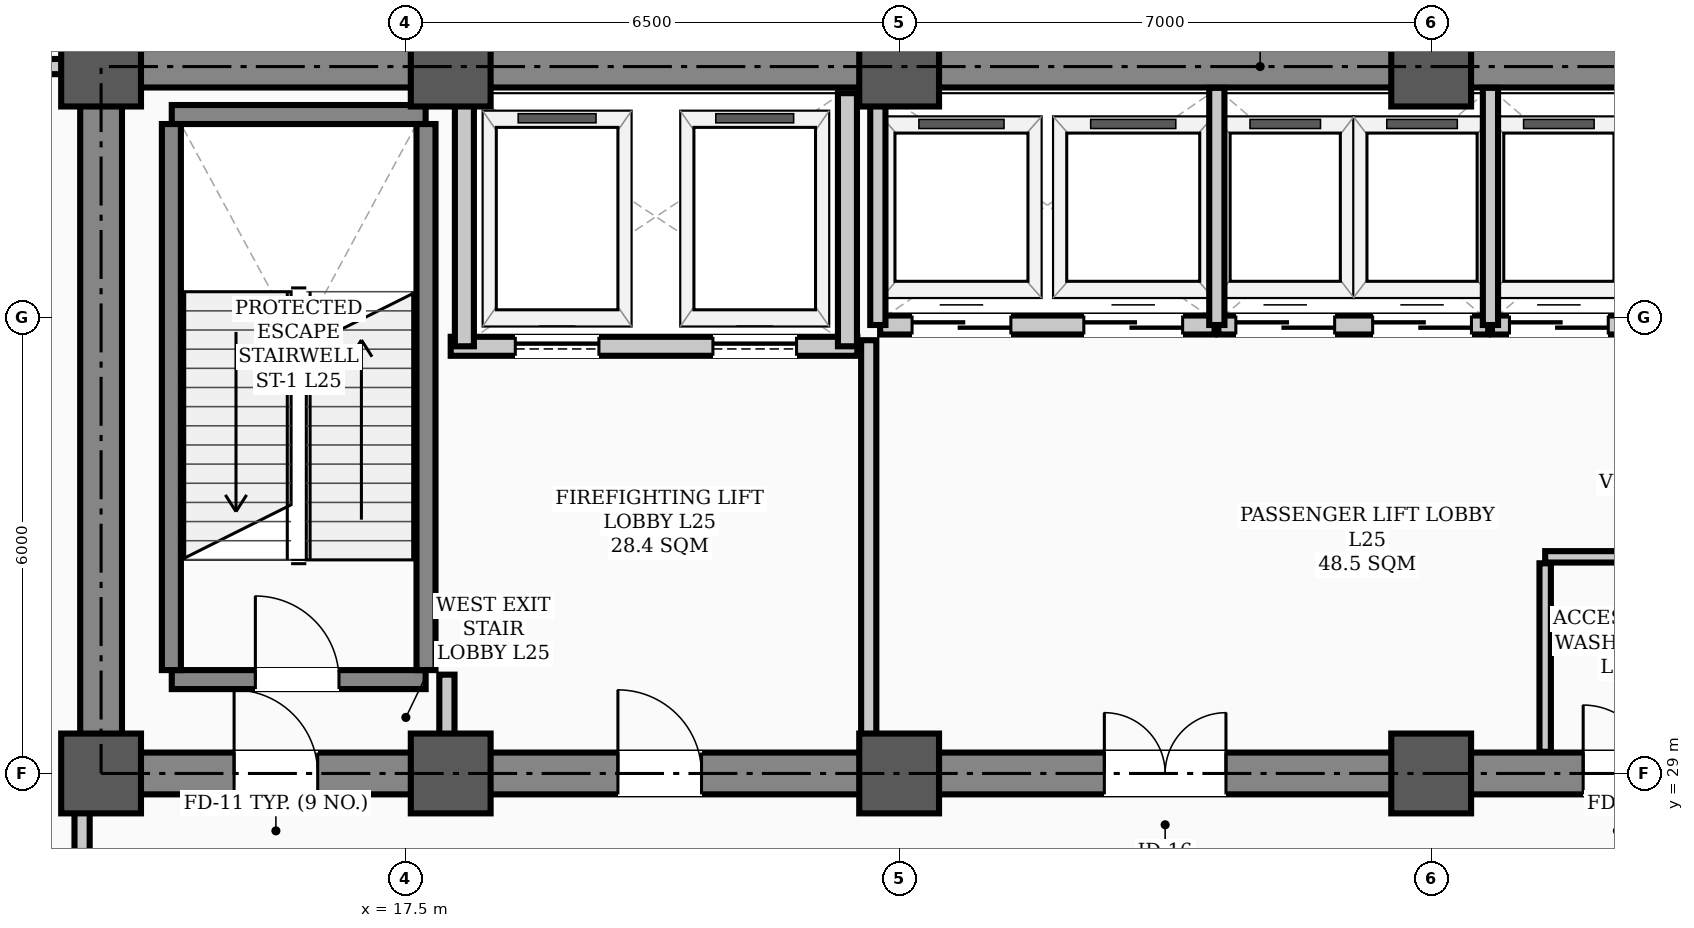
"""IFC4 building model, lengths in metres.
Left out: names, types, materials, properties, quantities, classifications, styles, units other than length and angle.
Written with IfcOpenShell. Run it as: python <this file> out.ifc"""

import sys

from ifc_helpers import new_model, si_unit, direction, frame, frame_2d, origin, origin_2d, place, context, subcontext, project, spatial, rectangle, hollow_rectangle, extrude, element, fill, save


model = new_model("IFC4")
c1 = context("Model", 3, precision=1e-05, world=origin(), true_north=direction((0.0, 1.0)))
c2 = subcontext(c1, "Body", "Model", "MODEL_VIEW")
j1 = project(units=[si_unit("LENGTHUNIT", "METRE"), si_unit("PLANEANGLEUNIT", "RADIAN")], contexts=[c1])
p1 = place(None, origin())
s1 = spatial("IfcSite", under=j1, at=p1, CompositionType="ELEMENT")
p2 = place(p1, origin())
s2 = spatial("IfcBuilding", under=s1, at=p2, CompositionType="ELEMENT")
p3 = place(p2, frame((0.0, 0.0, 100.6)))
s3 = spatial("IfcBuildingStorey", under=s2, at=p3, CompositionType="ELEMENT", Elevation=100.6)
for number, where, z_axis, x_axis in (
    (1, (13.5, 29.0, 0.0), (0.0, 0.0, 1.0), (1.0, 0.0, 0.0)),
    (2, (13.5, 38.3, 0.0), (0.0, 0.0, 1.0), (1.0, 0.0, 0.0)),
    (3, (18.1, 29.0, 0.0), (0.0, 0.0, 1.0), (1.0, 0.0, 0.0)),
    (4, (18.1, 38.3, 0.0), (0.0, 0.0, 1.0), (1.0, 0.0, 0.0)),
    (5, (24.0, 29.0, 0.0), (0.0, 0.0, 1.0), (1.0, 0.0, 0.0)),
    (6, (24.0, 38.3, 0.0), (0.0, 0.0, 1.0), (1.0, 0.0, 0.0)),
    (7, (31.0, 29.0, 0.0), (0.0, 0.0, 1.0), (1.0, 0.0, 0.0)),
    (8, (31.0, 38.3, 0.0), (0.0, 0.0, 1.0), (1.0, 0.0, 0.0)),
):
    element("IfcColumn", number, at=place(p3, frame(where, z_axis=z_axis, x_axis=x_axis)), inside=s3, PredefinedType="COLUMN", context=c2, shape_type="SweptSolid", body=[
        extrude(hollow_rectangle(XDim=1.05, YDim=1.05, WallThickness=0.038, InnerFilletRadius=0.019, OuterFilletRadius=0.057, at=origin_2d()), origin(), (0.0, 0.0, 1.0), 5.4),
    ])
p4 = place(p3, frame((13.5, 29.0, 0.0), z_axis=(0.0, 0.0, 1.0), x_axis=(1.0, 0.0, 0.0)))
e9 = element("IfcWall", 9, at=p4, inside=s3, PredefinedType="SHEAR", context=c2, shape_type="SweptSolid", body=[
    extrude(rectangle(XDim=30.5, YDim=0.55, at=frame_2d((15.25, 0.0))), origin(), (0.0, 0.0, 1.0), 5.22),
])
p5 = place(p4, frame((1.75, 0.0, 0.0)))
e10 = element("IfcOpeningElement", 10, at=p5, cuts=e9, PredefinedType="OPENING", context=c2, shape_type="SweptSolid", body=[
    extrude(rectangle(XDim=1.1, YDim=2.08, at=frame_2d((0.55, 1.04))), frame((0.0, 0.285, 0.0), z_axis=(0.0, -1.0, 0.0), x_axis=(1.0, 0.0, 0.0)), (0.0, 0.0, 1.0), 0.57),
])
p6 = place(p4, frame((26.7, 0.0, 0.0)))
e11 = element("IfcOpeningElement", 11, at=p6, cuts=e9, PredefinedType="OPENING", context=c2, shape_type="SweptSolid", body=[
    extrude(rectangle(XDim=1.1, YDim=2.08, at=frame_2d((0.55, 1.04))), frame((0.0, 0.285, 0.0), z_axis=(0.0, -1.0, 0.0), x_axis=(1.0, 0.0, 0.0)), (0.0, 0.0, 1.0), 0.57),
])
p7 = place(p4, frame((6.8, 0.0, 0.0)))
e12 = element("IfcOpeningElement", 12, at=p7, cuts=e9, PredefinedType="OPENING", context=c2, shape_type="SweptSolid", body=[
    extrude(rectangle(XDim=1.1, YDim=2.08, at=frame_2d((0.55, 1.04))), frame((0.0, 0.285, 0.0), z_axis=(0.0, -1.0, 0.0), x_axis=(1.0, 0.0, 0.0)), (0.0, 0.0, 1.0), 0.57),
])
p8 = place(p4, frame((13.2, 0.0, 0.0)))
e13 = element("IfcOpeningElement", 13, at=p8, cuts=e9, PredefinedType="OPENING", context=c2, shape_type="SweptSolid", body=[
    extrude(rectangle(XDim=1.6, YDim=2.08, at=frame_2d((0.8, 1.04))), frame((0.0, 0.285, 0.0), z_axis=(0.0, -1.0, 0.0), x_axis=(1.0, 0.0, 0.0)), (0.0, 0.0, 1.0), 0.57),
])
p9 = place(p4, frame((19.5, 0.0, 0.0)))
e14 = element("IfcOpeningElement", 14, at=p9, cuts=e9, PredefinedType="OPENING", context=c2, shape_type="SweptSolid", body=[
    extrude(rectangle(XDim=0.9, YDim=2.08, at=frame_2d((0.45, 1.04))), frame((0.0, 0.285, 0.0), z_axis=(0.0, -1.0, 0.0), x_axis=(1.0, 0.0, 0.0)), (0.0, 0.0, 1.0), 0.57),
])
p10 = place(p4, frame((21.55, 0.0, 0.0)))
e15 = element("IfcOpeningElement", 15, at=p10, cuts=e9, PredefinedType="OPENING", context=c2, shape_type="SweptSolid", body=[
    extrude(rectangle(XDim=0.9, YDim=2.08, at=frame_2d((0.45, 1.04))), frame((0.0, 0.285, 0.0), z_axis=(0.0, -1.0, 0.0), x_axis=(1.0, 0.0, 0.0)), (0.0, 0.0, 1.0), 0.57),
])
p11 = place(p3, frame((13.5, 38.3, 0.0), z_axis=(0.0, 0.0, 1.0), x_axis=(1.0, 0.0, 0.0)))
e16 = element("IfcWall", 16, at=p11, inside=s3, PredefinedType="SHEAR", context=c2, shape_type="SweptSolid", body=[
    extrude(rectangle(XDim=30.5, YDim=0.55, at=frame_2d((15.25, 0.0))), origin(), (0.0, 0.0, 1.0), 5.22),
])
p12 = place(p3, frame((13.5, 29.35, 0.0), z_axis=(0.0, 0.0, 1.0), x_axis=(0.0, 1.0, 0.0)))
e17 = element("IfcWall", 17, at=p12, inside=s3, PredefinedType="SHEAR", context=c2, shape_type="SweptSolid", body=[
    extrude(rectangle(XDim=8.6, YDim=0.55, at=frame_2d((4.3, 0.0))), origin(), (0.0, 0.0, 1.0), 5.22),
])
p13 = place(p3, frame((14.43, 30.235, 0.0), z_axis=(0.0, 0.0, 1.0), x_axis=(1.0, 0.0, 0.0)))
e18 = element("IfcWall", 18, at=p13, inside=s3, PredefinedType="STANDARD", context=c2, shape_type="SweptSolid", body=[
    extrude(rectangle(XDim=3.34, YDim=0.25, at=frame_2d((1.67, 0.0))), origin(), (0.0, 0.0, 1.0), 5.22),
])
p14 = place(p13, frame((1.1, 0.0, 0.0)))
e19 = element("IfcOpeningElement", 19, at=p14, cuts=e18, PredefinedType="OPENING", context=c2, shape_type="SweptSolid", body=[
    extrude(rectangle(XDim=1.1, YDim=2.08, at=frame_2d((0.55, 1.04))), frame((0.0, 0.135, 0.0), z_axis=(0.0, -1.0, 0.0), x_axis=(1.0, 0.0, 0.0)), (0.0, 0.0, 1.0), 0.27),
])
p15 = place(p3, frame((14.43, 37.669, 0.0), z_axis=(0.0, 0.0, 1.0), x_axis=(1.0, 0.0, 0.0)))
e20 = element("IfcWall", 20, at=p15, inside=s3, PredefinedType="STANDARD", context=c2, shape_type="SweptSolid", body=[
    extrude(rectangle(XDim=3.34, YDim=0.25, at=frame_2d((1.67, 0.0))), origin(), (0.0, 0.0, 1.0), 5.22),
])
for number, where, z_axis, x_axis in (
    (21, (14.425, 30.36, 0.0), (0.0, 0.0, 1.0), (0.0, 1.0, 0.0)),
    (22, (17.775, 30.36, 0.0), (0.0, 0.0, 1.0), (0.0, 1.0, 0.0)),
):
    element("IfcWall", number, at=place(p3, frame(where, z_axis=z_axis, x_axis=x_axis)), inside=s3, PredefinedType="STANDARD", context=c2, shape_type="SweptSolid", body=[
        extrude(rectangle(XDim=7.184, YDim=0.25, at=frame_2d((3.592, 0.0))), origin(), (0.0, 0.0, 1.0), 5.22),
    ])
p16 = place(p3, frame((18.1, 34.62, 0.0), z_axis=(0.0, 0.0, 1.0), x_axis=(1.0, 0.0, 0.0)))
e23 = element("IfcWall", 23, at=p16, inside=s3, PredefinedType="STANDARD", context=c2, shape_type="SweptSolid", body=[
    extrude(rectangle(XDim=5.35, YDim=0.25, at=frame_2d((2.675, 0.0))), origin(), (0.0, 0.0, 1.0), 5.22),
])
p17 = place(p16, frame((0.85, 0.0, 0.0)))
e24 = element("IfcOpeningElement", 24, at=p17, cuts=e23, PredefinedType="OPENING", context=c2, shape_type="SweptSolid", body=[
    extrude(rectangle(XDim=1.1, YDim=2.08, at=frame_2d((0.55, 1.04))), frame((0.0, 0.135, 0.0), z_axis=(0.0, -1.0, 0.0), x_axis=(1.0, 0.0, 0.0)), (0.0, 0.0, 1.0), 0.27),
])
p18 = place(p16, frame((3.45, 0.0, 0.0)))
e25 = element("IfcOpeningElement", 25, at=p18, cuts=e23, PredefinedType="OPENING", context=c2, shape_type="SweptSolid", body=[
    extrude(rectangle(XDim=1.1, YDim=2.08, at=frame_2d((0.55, 1.04))), frame((0.0, 0.135, 0.0), z_axis=(0.0, -1.0, 0.0), x_axis=(1.0, 0.0, 0.0)), (0.0, 0.0, 1.0), 0.27),
])
for number, where, z_axis, x_axis in (
    (26, (18.28, 34.62, 0.0), (0.0, 0.0, 1.0), (0.0, 1.0, 0.0)),
    (27, (23.32, 34.62, 0.0), (0.0, 0.0, 1.0), (0.0, 1.0, 0.0)),
):
    element("IfcWall", number, at=place(p3, frame(where, z_axis=z_axis, x_axis=x_axis)), inside=s3, PredefinedType="STANDARD", context=c2, shape_type="SweptSolid", body=[
        extrude(rectangle(XDim=3.33, YDim=0.25, at=frame_2d((1.665, 0.0))), origin(), (0.0, 0.0, 1.0), 4.8),
    ])
p19 = place(p3, frame((23.75, 34.9, 0.0), z_axis=(0.0, 0.0, 1.0), x_axis=(1.0, 0.0, 0.0)))
e28 = element("IfcWall", 28, at=p19, inside=s3, PredefinedType="STANDARD", context=c2, shape_type="SweptSolid", body=[
    extrude(rectangle(XDim=4.4, YDim=0.25, at=frame_2d((2.2, 0.0))), origin(), (0.0, 0.0, 1.0), 5.22),
])
p20 = place(p19, frame((0.42, 0.0, 0.0)))
e29 = element("IfcOpeningElement", 29, at=p20, cuts=e28, PredefinedType="OPENING", context=c2, shape_type="SweptSolid", body=[
    extrude(rectangle(XDim=1.3, YDim=2.08, at=frame_2d((0.65, 1.04))), frame((0.0, 0.135, 0.0), z_axis=(0.0, -1.0, 0.0), x_axis=(1.0, 0.0, 0.0)), (0.0, 0.0, 1.0), 0.27),
])
p21 = place(p19, frame((2.68, 0.0, 0.0)))
e30 = element("IfcOpeningElement", 30, at=p21, cuts=e28, PredefinedType="OPENING", context=c2, shape_type="SweptSolid", body=[
    extrude(rectangle(XDim=1.3, YDim=2.08, at=frame_2d((0.65, 1.04))), frame((0.0, 0.135, 0.0), z_axis=(0.0, -1.0, 0.0), x_axis=(1.0, 0.0, 0.0)), (0.0, 0.0, 1.0), 0.27),
])
p22 = place(p3, frame((28.2, 34.9, 0.0), z_axis=(0.0, 0.0, 1.0), x_axis=(1.0, 0.0, 0.0)))
e31 = element("IfcWall", 31, at=p22, inside=s3, PredefinedType="STANDARD", context=c2, shape_type="SweptSolid", body=[
    extrude(rectangle(XDim=3.55, YDim=0.25, at=frame_2d((1.775, 0.0))), origin(), (0.0, 0.0, 1.0), 5.22),
])
p23 = place(p22, frame((0.23, 0.0, 0.0)))
e32 = element("IfcOpeningElement", 32, at=p23, cuts=e31, PredefinedType="OPENING", context=c2, shape_type="SweptSolid", body=[
    extrude(rectangle(XDim=1.3, YDim=2.08, at=frame_2d((0.65, 1.04))), frame((0.0, 0.135, 0.0), z_axis=(0.0, -1.0, 0.0), x_axis=(1.0, 0.0, 0.0)), (0.0, 0.0, 1.0), 0.27),
])
p24 = place(p22, frame((2.03, 0.0, 0.0)))
e33 = element("IfcOpeningElement", 33, at=p24, cuts=e31, PredefinedType="OPENING", context=c2, shape_type="SweptSolid", body=[
    extrude(rectangle(XDim=1.3, YDim=2.08, at=frame_2d((0.65, 1.04))), frame((0.0, 0.135, 0.0), z_axis=(0.0, -1.0, 0.0), x_axis=(1.0, 0.0, 0.0)), (0.0, 0.0, 1.0), 0.27),
])
p25 = place(p3, frame((31.8, 34.9, 0.0), z_axis=(0.0, 0.0, 1.0), x_axis=(1.0, 0.0, 0.0)))
e34 = element("IfcWall", 34, at=p25, inside=s3, PredefinedType="STANDARD", context=c2, shape_type="SweptSolid", body=[
    extrude(rectangle(XDim=3.6, YDim=0.25, at=frame_2d((1.8, 0.0))), origin(), (0.0, 0.0, 1.0), 5.22),
])
p26 = place(p25, frame((0.23, 0.0, 0.0)))
e35 = element("IfcOpeningElement", 35, at=p26, cuts=e34, PredefinedType="OPENING", context=c2, shape_type="SweptSolid", body=[
    extrude(rectangle(XDim=1.3, YDim=2.08, at=frame_2d((0.65, 1.04))), frame((0.0, 0.135, 0.0), z_axis=(0.0, -1.0, 0.0), x_axis=(1.0, 0.0, 0.0)), (0.0, 0.0, 1.0), 0.27),
])
p27 = place(p25, frame((2.03, 0.0, 0.0)))
e36 = element("IfcOpeningElement", 36, at=p27, cuts=e34, PredefinedType="OPENING", context=c2, shape_type="SweptSolid", body=[
    extrude(rectangle(XDim=1.3, YDim=2.08, at=frame_2d((0.65, 1.04))), frame((0.0, 0.135, 0.0), z_axis=(0.0, -1.0, 0.0), x_axis=(1.0, 0.0, 0.0)), (0.0, 0.0, 1.0), 0.27),
])
p28 = place(p3, frame((32.5, 31.85, 0.0), z_axis=(0.0, 0.0, 1.0), x_axis=(1.0, 0.0, 0.0)))
e37 = element("IfcWall", 37, at=p28, inside=s3, PredefinedType="PARTITIONING", context=c2, shape_type="SweptSolid", body=[
    extrude(rectangle(XDim=4.1, YDim=0.15, at=frame_2d((2.05, 0.0))), origin(), (0.0, 0.0, 1.0), 5.22),
])
p29 = place(p3, frame((7.81, 38.3, 0.0), z_axis=(0.0, 0.0, 1.0), x_axis=(1.0, 0.0, 0.0)))
e38 = element("IfcWall", 38, at=p29, inside=s3, PredefinedType="STANDARD", context=c2, shape_type="SweptSolid", body=[
    extrude(rectangle(XDim=5.69, YDim=0.2, at=frame_2d((2.845, 0.0))), origin(), (0.0, 0.0, 1.0), 4.5),
])
p30 = place(p3, frame((18.05, 29.285, 0.0), z_axis=(0.0, 0.0, 1.0), x_axis=(0.0, 1.0, 0.0)))
e39 = element("IfcWall", 39, at=p30, inside=s3, PredefinedType="STANDARD", context=c2, shape_type="SweptSolid", body=[
    extrude(rectangle(XDim=1.015, YDim=0.2, at=frame_2d((0.508, 0.0))), origin(), (0.0, 0.0, 1.0), 4.8),
])
p31 = place(p3, frame((23.6, 29.285, 0.0), z_axis=(0.0, 0.0, 1.0), x_axis=(0.0, 1.0, 0.0)))
e40 = element("IfcWall", 40, at=p31, inside=s3, PredefinedType="STANDARD", context=c2, shape_type="SweptSolid", body=[
    extrude(rectangle(XDim=5.415, YDim=0.2, at=frame_2d((2.708, 0.0))), origin(), (0.0, 0.0, 1.0), 4.6),
])
p32 = place(p3, frame((32.5, 29.285, 0.0), z_axis=(0.0, 0.0, 1.0), x_axis=(0.0, 1.0, 0.0)))
e41 = element("IfcWall", 41, at=p32, inside=s3, PredefinedType="PARTITIONING", context=c2, shape_type="SweptSolid", body=[
    extrude(rectangle(XDim=2.48, YDim=0.15, at=frame_2d((1.24, 0.0))), origin(), (0.0, 0.0, 1.0), 4.8),
])
p33 = place(p3, frame((13.25, 26.11, 0.0), z_axis=(0.0, 0.0, 1.0), x_axis=(0.0, 1.0, 0.0)))
e42 = element("IfcWall", 42, at=p33, inside=s3, PredefinedType="STANDARD", context=c2, shape_type="SweptSolid", body=[
    extrude(rectangle(XDim=3.24, YDim=0.2, at=frame_2d((1.62, 0.0))), origin(), (0.0, 0.0, 1.0), 4.5),
])
p34 = place(p33, frame((0.79, 0.0, 0.0)))
e43 = element("IfcOpeningElement", 43, at=p34, cuts=e42, PredefinedType="OPENING", context=c2, shape_type="SweptSolid", body=[
    extrude(rectangle(XDim=1.1, YDim=2.08, at=frame_2d((0.55, 1.04))), frame((0.0, 0.11, 0.0), z_axis=(0.0, -1.0, 0.0), x_axis=(1.0, 0.0, 0.0)), (0.0, 0.0, 1.0), 0.22),
])
p35 = place(p3, frame((23.72, 34.9, 0.0), z_axis=(0.0, 0.0, 1.0), x_axis=(0.0, 1.0, 0.0)))
e44 = element("IfcWall", 44, at=p35, inside=s3, PredefinedType="STANDARD", context=c2, shape_type="SweptSolid", body=[
    extrude(rectangle(XDim=3.12, YDim=0.2, at=frame_2d((1.56, 0.0))), origin(), (0.0, 0.0, 1.0), 4.6),
])
for number, where, z_axis, x_axis in (
    (45, (28.18, 34.9, 0.0), (0.0, 0.0, 1.0), (0.0, 1.0, 0.0)),
    (46, (31.78, 34.9, 0.0), (0.0, 0.0, 1.0), (0.0, 1.0, 0.0)),
):
    element("IfcWall", number, at=place(p3, frame(where, z_axis=z_axis, x_axis=x_axis)), inside=s3, PredefinedType="STANDARD", context=c2, shape_type="SweptSolid", body=[
        extrude(rectangle(XDim=3.12, YDim=0.2, at=frame_2d((1.56, 0.0))), origin(), (0.0, 0.0, 1.0), 4.8),
    ])
p36 = place(p14, origin())
e47 = element("IfcDoor", 47, at=p36, inside=s3, OperationType="SINGLE_SWING_LEFT", PredefinedType="DOOR", context=c2, shape_type="SweptSolid", body=[
    extrude(rectangle(XDim=1.1, YDim=2.08, at=frame_2d((0.55, 1.04))), frame((0.0, 0.025, 0.0), z_axis=(0.0, -1.0, 0.0), x_axis=(1.0, 0.0, 0.0)), (0.0, 0.0, 1.0), 0.05),
])
fill(e19, e47)
p37 = place(p5, origin())
e48 = element("IfcDoor", 48, at=p37, inside=s3, OperationType="SINGLE_SWING_LEFT", PredefinedType="DOOR", context=c2, shape_type="SweptSolid", body=[
    extrude(rectangle(XDim=1.1, YDim=2.08, at=frame_2d((0.55, 1.04))), frame((0.0, 0.025, 0.0), z_axis=(0.0, -1.0, 0.0), x_axis=(1.0, 0.0, 0.0)), (0.0, 0.0, 1.0), 0.05),
])
fill(e10, e48)
p38 = place(p7, origin())
e49 = element("IfcDoor", 49, at=p38, inside=s3, OperationType="SINGLE_SWING_LEFT", PredefinedType="DOOR", context=c2, shape_type="SweptSolid", body=[
    extrude(rectangle(XDim=1.1, YDim=2.08, at=frame_2d((0.55, 1.04))), frame((0.0, 0.025, 0.0), z_axis=(0.0, -1.0, 0.0), x_axis=(1.0, 0.0, 0.0)), (0.0, 0.0, 1.0), 0.05),
])
fill(e12, e49)
p39 = place(p8, origin())
e50 = element("IfcDoor", 50, at=p39, inside=s3, OperationType="DOUBLE_DOOR_SINGLE_SWING", PredefinedType="DOOR", context=c2, shape_type="SweptSolid", body=[
    extrude(rectangle(XDim=1.6, YDim=2.08, at=frame_2d((0.8, 1.04))), frame((0.0, 0.025, 0.0), z_axis=(0.0, -1.0, 0.0), x_axis=(1.0, 0.0, 0.0)), (0.0, 0.0, 1.0), 0.05),
])
fill(e13, e50)
p40 = place(p9, origin())
e51 = element("IfcDoor", 51, at=p40, inside=s3, OperationType="SINGLE_SWING_LEFT", PredefinedType="DOOR", context=c2, shape_type="SweptSolid", body=[
    extrude(rectangle(XDim=0.9, YDim=2.08, at=frame_2d((0.45, 1.04))), frame((0.0, 0.025, 0.0), z_axis=(0.0, -1.0, 0.0), x_axis=(1.0, 0.0, 0.0)), (0.0, 0.0, 1.0), 0.05),
])
fill(e14, e51)
p41 = place(p17, origin())
e52 = element("IfcDoor", 52, at=p41, inside=s3, OperationType="SLIDING_TO_LEFT", PredefinedType="DOOR", context=c2, shape_type="SweptSolid", body=[
    extrude(rectangle(XDim=1.1, YDim=2.08, at=frame_2d((0.55, 1.04))), frame((0.0, 0.025, 0.0), z_axis=(0.0, -1.0, 0.0), x_axis=(1.0, 0.0, 0.0)), (0.0, 0.0, 1.0), 0.05),
])
fill(e24, e52)
p42 = place(p18, origin())
e53 = element("IfcDoor", 53, at=p42, inside=s3, OperationType="SLIDING_TO_LEFT", PredefinedType="DOOR", context=c2, shape_type="SweptSolid", body=[
    extrude(rectangle(XDim=1.1, YDim=2.08, at=frame_2d((0.55, 1.04))), frame((0.0, 0.025, 0.0), z_axis=(0.0, -1.0, 0.0), x_axis=(1.0, 0.0, 0.0)), (0.0, 0.0, 1.0), 0.05),
])
fill(e25, e53)
p43 = place(p20, origin())
e54 = element("IfcDoor", 54, at=p43, inside=s3, OperationType="DOUBLE_DOOR_SLIDING", PredefinedType="DOOR", context=c2, shape_type="SweptSolid", body=[
    extrude(rectangle(XDim=1.3, YDim=2.08, at=frame_2d((0.65, 1.04))), frame((0.0, 0.025, 0.0), z_axis=(0.0, -1.0, 0.0), x_axis=(1.0, 0.0, 0.0)), (0.0, 0.0, 1.0), 0.05),
])
fill(e29, e54)
p44 = place(p21, origin())
e55 = element("IfcDoor", 55, at=p44, inside=s3, OperationType="DOUBLE_DOOR_SLIDING", PredefinedType="DOOR", context=c2, shape_type="SweptSolid", body=[
    extrude(rectangle(XDim=1.3, YDim=2.08, at=frame_2d((0.65, 1.04))), frame((0.0, 0.025, 0.0), z_axis=(0.0, -1.0, 0.0), x_axis=(1.0, 0.0, 0.0)), (0.0, 0.0, 1.0), 0.05),
])
fill(e30, e55)
p45 = place(p23, origin())
e56 = element("IfcDoor", 56, at=p45, inside=s3, OperationType="DOUBLE_DOOR_SLIDING", PredefinedType="DOOR", context=c2, shape_type="SweptSolid", body=[
    extrude(rectangle(XDim=1.3, YDim=2.08, at=frame_2d((0.65, 1.04))), frame((0.0, 0.025, 0.0), z_axis=(0.0, -1.0, 0.0), x_axis=(1.0, 0.0, 0.0)), (0.0, 0.0, 1.0), 0.05),
])
fill(e32, e56)
p46 = place(p24, origin())
e57 = element("IfcDoor", 57, at=p46, inside=s3, OperationType="DOUBLE_DOOR_SLIDING", PredefinedType="DOOR", context=c2, shape_type="SweptSolid", body=[
    extrude(rectangle(XDim=1.3, YDim=2.08, at=frame_2d((0.65, 1.04))), frame((0.0, 0.025, 0.0), z_axis=(0.0, -1.0, 0.0), x_axis=(1.0, 0.0, 0.0)), (0.0, 0.0, 1.0), 0.05),
])
fill(e33, e57)
p47 = place(p26, origin())
e58 = element("IfcDoor", 58, at=p47, inside=s3, OperationType="DOUBLE_DOOR_SLIDING", PredefinedType="DOOR", context=c2, shape_type="SweptSolid", body=[
    extrude(rectangle(XDim=1.3, YDim=2.08, at=frame_2d((0.65, 1.04))), frame((0.0, 0.025, 0.0), z_axis=(0.0, -1.0, 0.0), x_axis=(1.0, 0.0, 0.0)), (0.0, 0.0, 1.0), 0.05),
])
fill(e35, e58)
save(model, sys.argv[1])
